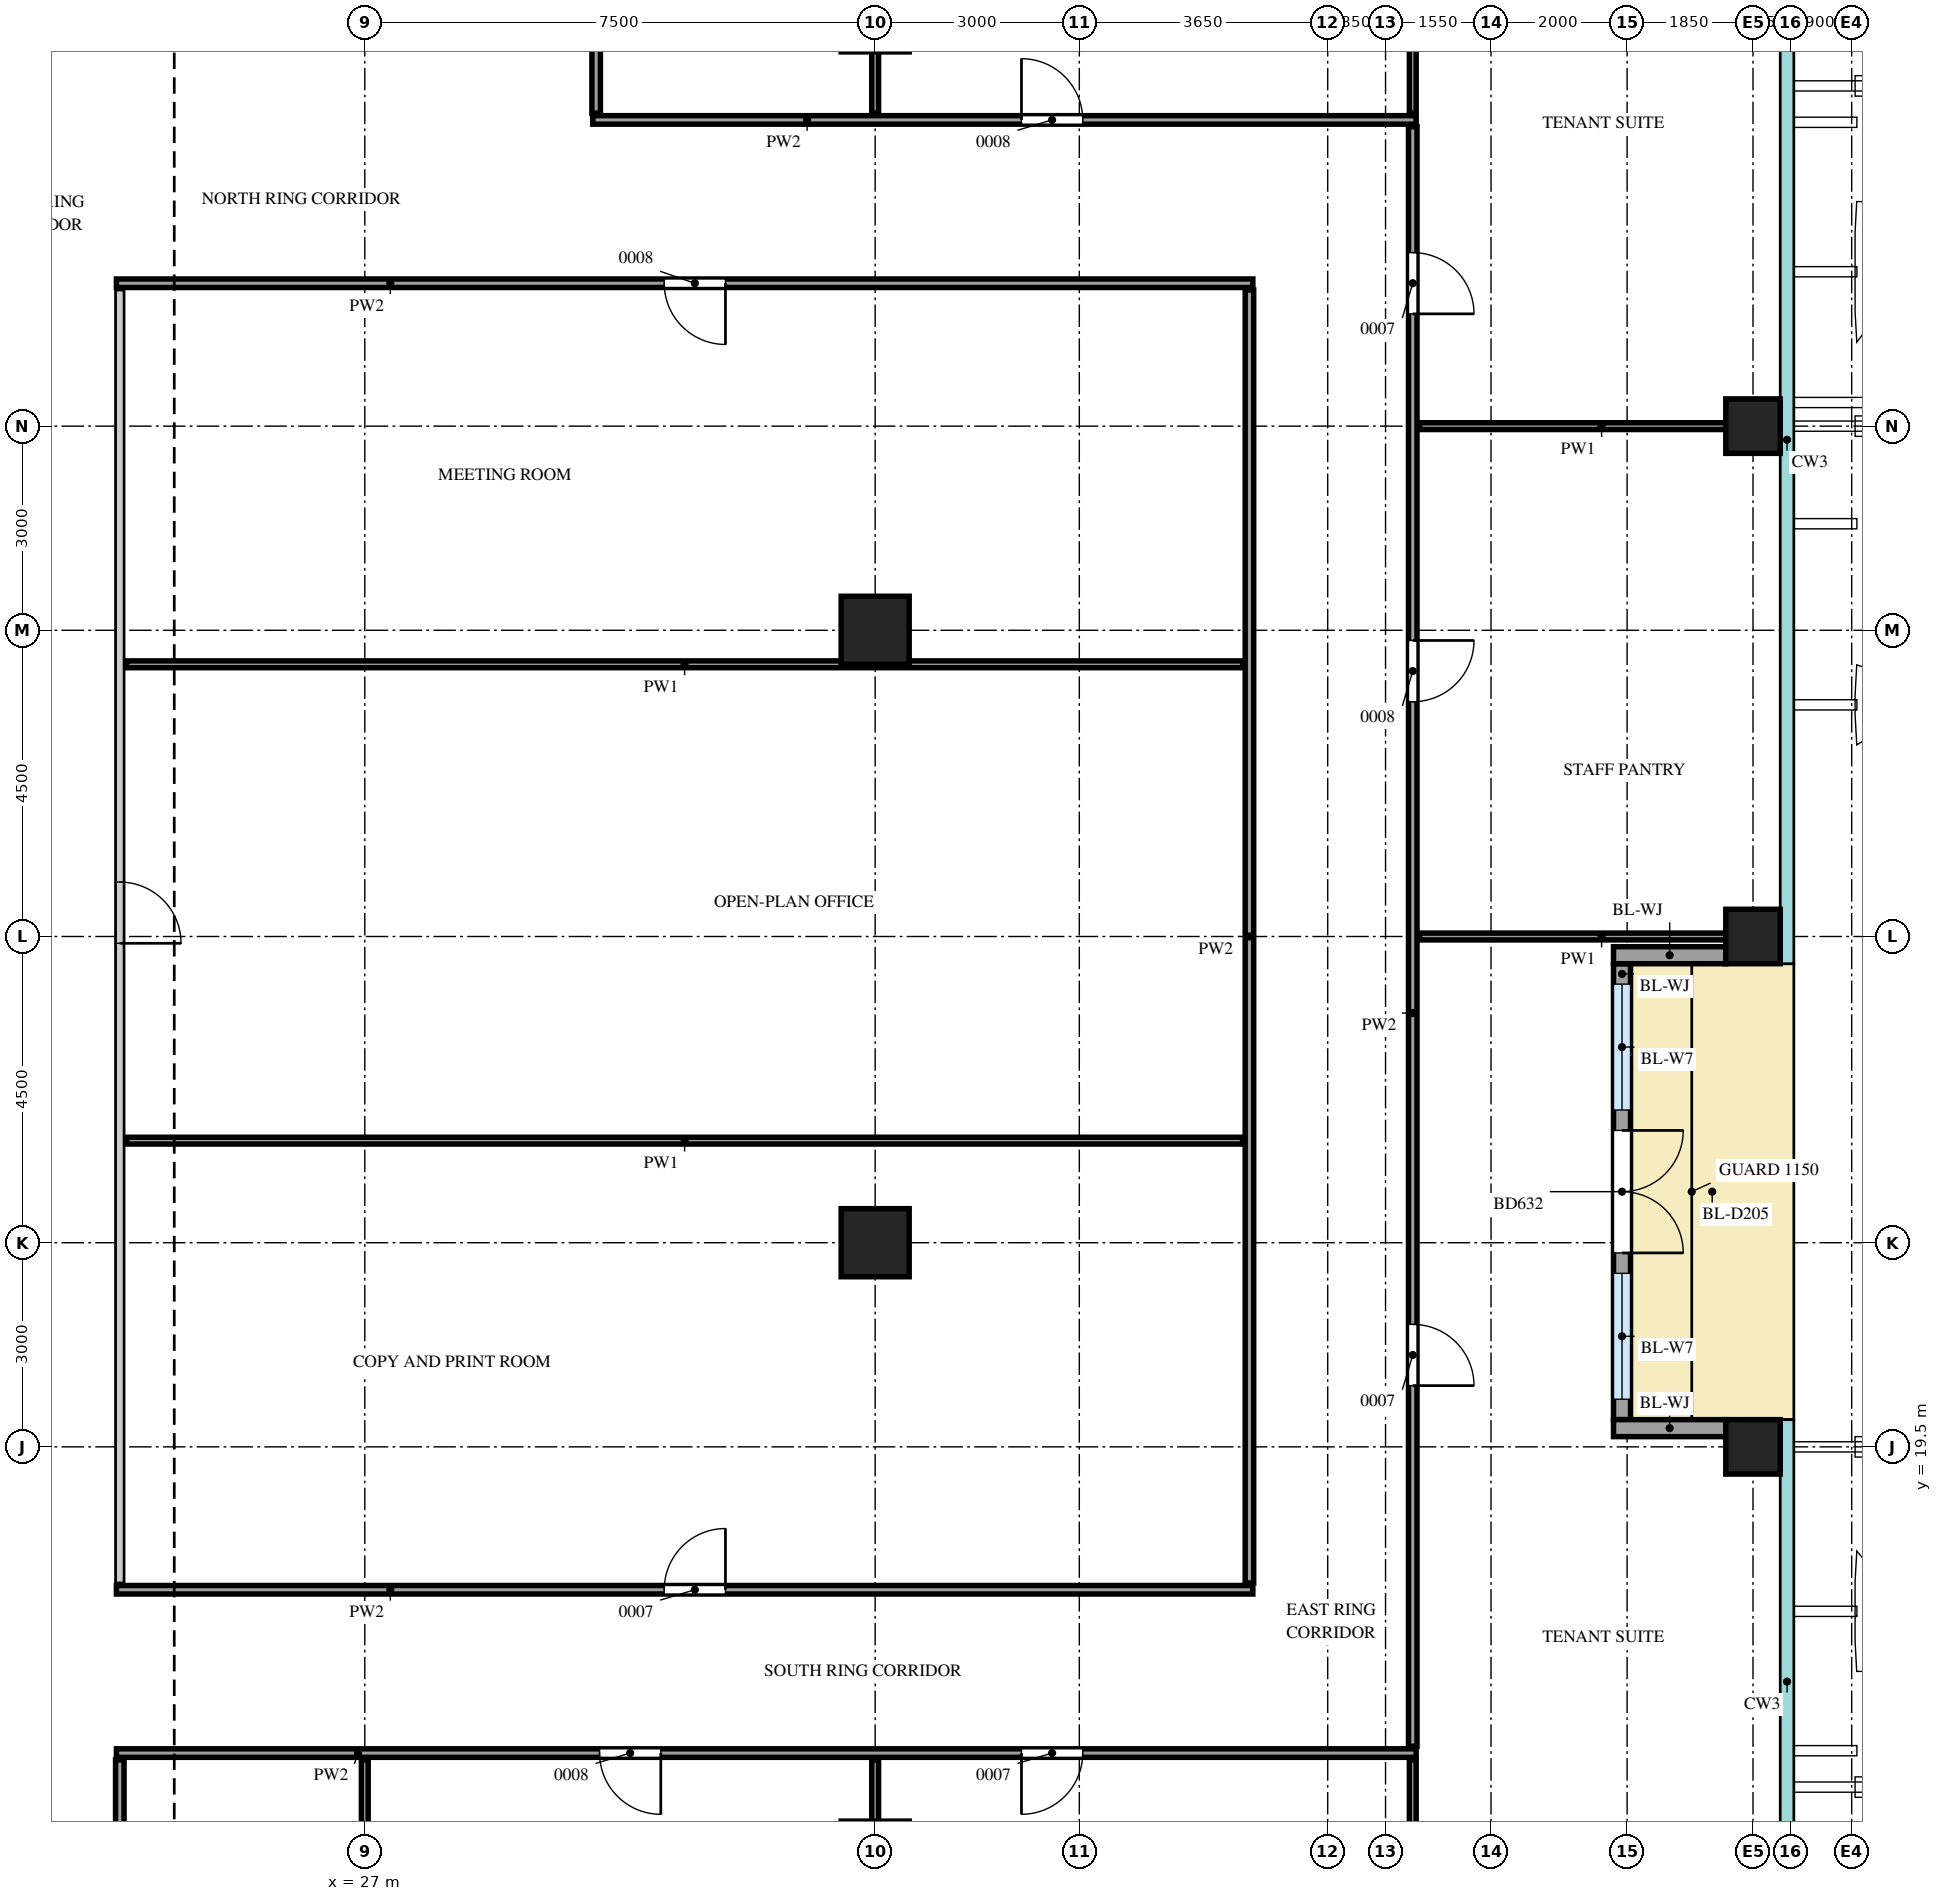
"""IFC4 building model, lengths in metres.
Left out: names, types, materials, properties, quantities, classifications, styles, units other than length and angle.
Written with IfcOpenShell. Run it as: python <this file> out.ifc"""

import sys

from ifc_helpers import new_model, si_unit, direction, frame, frame_2d, origin, origin_2d, place, context, subcontext, project, spatial, rectangle, extrude, source, transform, mapped, element, fill, save


model = new_model("IFC4")
c1 = context("Model", 3, precision=1e-05, world=origin(), true_north=direction((0.0, 1.0)))
c2 = subcontext(c1, "Body", "Model", "MODEL_VIEW")
j1 = project(units=[si_unit("LENGTHUNIT", "METRE"), si_unit("PLANEANGLEUNIT", "RADIAN")], contexts=[c1])
p1 = place(None, origin())
s1 = spatial("IfcSite", under=j1, at=p1, CompositionType="ELEMENT")
p2 = place(p1, origin())
s2 = spatial("IfcBuilding", under=s1, at=p2, CompositionType="ELEMENT")
p3 = place(p2, frame((0.0, 0.0, 282.2)))
s3 = spatial("IfcBuildingStorey", under=s2, at=p3, CompositionType="ELEMENT", Elevation=282.2)
m1 = source(origin(), c2, "Body", "SweptSolid", [
    extrude(rectangle(XDim=0.8, YDim=0.8, at=origin_2d()), origin(), (0.0, 0.0, 1.0), 3.75),
])
for number, where, z_axis, x_axis in (
    (1, (47.4, 19.5, 0.0), (0.0, 0.0, 1.0), (1.0, 0.0, 0.0)),
    (2, (47.4, 27.0, 0.0), (0.0, 0.0, 1.0), (1.0, 0.0, 0.0)),
    (3, (47.4, 34.5, 0.0), (0.0, 0.0, 1.0), (1.0, 0.0, 0.0)),
):
    element("IfcColumn", number, at=place(p3, frame(where, z_axis=z_axis, x_axis=x_axis)), inside=s3, PredefinedType="COLUMN", context=c2, shape_type="MappedRepresentation", body=[
        mapped(m1, transform((0.0, 0.0, 0.0))),
    ])
m2 = source(origin(), c2, "Body", "SweptSolid", [
    extrude(rectangle(XDim=1.0, YDim=1.0, at=origin_2d()), origin(), (0.0, 0.0, 1.0), 3.75),
])
for number, where, z_axis, x_axis in (
    (4, (34.5, 22.5, 0.0), (0.0, 0.0, 1.0), (1.0, 0.0, 0.0)),
    (5, (34.5, 31.5, 0.0), (0.0, 0.0, 1.0), (1.0, 0.0, 0.0)),
):
    element("IfcColumn", number, at=place(p3, frame(where, z_axis=z_axis, x_axis=x_axis)), inside=s3, PredefinedType="COLUMN", context=c2, shape_type="MappedRepresentation", body=[
        mapped(m2, transform((0.0, 0.0, 0.0))),
    ])
m3 = source(origin(), c2, "Body", "SweptSolid", [
    extrude(rectangle(XDim=6.7, YDim=0.25, at=frame_2d((3.35, 0.0))), origin(), (0.0, 0.0, 1.0), 3.2),
])
p4 = place(p3, frame((45.475, 19.9, 0.0), z_axis=(0.0, 0.0, 1.0), x_axis=(0.0, 1.0, 0.0)))
e6 = element("IfcWall", 6, at=p4, inside=s3, PredefinedType="SOLIDWALL", context=c2, shape_type="MappedRepresentation", body=[
    mapped(m3, transform((0.0, 0.0, 0.0))),
])
m4 = source(origin(), c2, "Body", "SweptSolid", [
    extrude(rectangle(XDim=1.85, YDim=2.4, at=frame_2d((0.925, 1.2))), frame((0.0, 0.135, 0.0), z_axis=(0.0, -1.0, 0.0), x_axis=(1.0, 0.0, 0.0)), (0.0, 0.0, 1.0), 0.27),
])
p5 = place(p4, frame((0.3, 0.0, 0.0)))
e7 = element("IfcOpeningElement", 7, at=p5, cuts=e6, PredefinedType="OPENING", context=c2, shape_type="MappedRepresentation", body=[
    mapped(m4, transform((0.0, 0.0, 0.0))),
])
p6 = place(p4, frame((4.55, 0.0, 0.0)))
e8 = element("IfcOpeningElement", 8, at=p6, cuts=e6, PredefinedType="OPENING", context=c2, shape_type="MappedRepresentation", body=[
    mapped(m4, transform((0.0, 0.0, 0.0))),
])
m5 = source(origin(), c2, "Body", "SweptSolid", [
    extrude(rectangle(XDim=1.8, YDim=2.4, at=frame_2d((0.9, 1.2))), frame((0.0, 0.135, 0.0), z_axis=(0.0, -1.0, 0.0), x_axis=(1.0, 0.0, 0.0)), (0.0, 0.0, 1.0), 0.27),
])
p7 = place(p4, frame((2.45, 0.0, 0.0)))
e9 = element("IfcOpeningElement", 9, at=p7, cuts=e6, PredefinedType="OPENING", context=c2, shape_type="MappedRepresentation", body=[
    mapped(m5, transform((0.0, 0.0, 0.0))),
])
m6 = source(origin(), c2, "Body", "SweptSolid", [
    extrude(rectangle(XDim=1.65, YDim=0.25, at=frame_2d((0.825, 0.0))), origin(), (0.0, 0.0, 1.0), 3.2),
])
for number, where, z_axis, x_axis in (
    (10, (47.0, 19.775, 0.0), (0.0, 0.0, 1.0), (-1.0, 0.0, 0.0)),
    (11, (47.0, 26.725, 0.0), (0.0, 0.0, 1.0), (-1.0, 0.0, 0.0)),
):
    element("IfcWall", number, at=place(p3, frame(where, z_axis=z_axis, x_axis=x_axis)), inside=s3, PredefinedType="SOLIDWALL", context=c2, shape_type="MappedRepresentation", body=[
        mapped(m6, transform((0.0, 0.0, 0.0))),
    ])
m7 = source(origin(), c2, "Body", "SweptSolid", [
    extrude(rectangle(XDim=8.75, YDim=0.125, at=frame_2d((4.375, 0.0))), origin(), (0.0, 0.0, 1.0), 3.8),
])
p8 = place(p3, frame((23.4, 6.15, 0.0), z_axis=(0.0, 0.0, 1.0), x_axis=(0.0, 1.0, 0.0)))
e12 = element("IfcWall", 12, at=p8, inside=s3, PredefinedType="PARTITIONING", context=c2, shape_type="MappedRepresentation", body=[
    mapped(m7, transform((0.0, 0.0, 0.0))),
])
m8 = source(origin(), c2, "Body", "SweptSolid", [
    extrude(rectangle(XDim=0.9, YDim=2.1, at=frame_2d((0.45, 1.05))), frame((0.0, 0.073, 0.0), z_axis=(0.0, -1.0, 0.0), x_axis=(1.0, 0.0, 0.0)), (0.0, 0.0, 1.0), 0.145),
])
p9 = place(p8, frame((2.25, 0.0, 0.0)))
e13 = element("IfcOpeningElement", 13, at=p9, cuts=e12, PredefinedType="OPENING", context=c2, shape_type="MappedRepresentation", body=[
    mapped(m8, transform((0.0, 0.0, 0.0))),
])
m9 = source(origin(), c2, "Body", "SweptSolid", [
    extrude(rectangle(XDim=8.75, YDim=0.1, at=frame_2d((4.375, 0.0))), origin(), (0.0, 0.0, 1.0), 3.35),
])
for number, where, z_axis, x_axis in (
    (14, (27.0, 6.15, 0.0), (0.0, 0.0, 1.0), (0.0, 1.0, 0.0)),
    (15, (34.5, 6.15, 0.0), (0.0, 0.0, 1.0), (0.0, 1.0, 0.0)),
):
    element("IfcWall", number, at=place(p3, frame(where, z_axis=z_axis, x_axis=x_axis)), inside=s3, PredefinedType="PARTITIONING", context=c2, shape_type="MappedRepresentation", body=[
        mapped(m9, transform((0.0, 0.0, 0.0))),
    ])
m10 = source(origin(), c2, "Body", "SweptSolid", [
    extrude(rectangle(XDim=2.75, YDim=0.1, at=frame_2d((1.375, 0.0))), origin(), (0.0, 0.0, 1.0), 3.8),
])
p10 = place(p3, frame((42.4, 12.15, 0.0), z_axis=(0.0, 0.0, 1.0), x_axis=(0.0, 1.0, 0.0)))
e16 = element("IfcWall", 16, at=p10, inside=s3, PredefinedType="PARTITIONING", context=c2, shape_type="MappedRepresentation", body=[
    mapped(m10, transform((0.0, 0.0, 0.0))),
])
m11 = source(origin(), c2, "Body", "SweptSolid", [
    extrude(rectangle(XDim=19.1, YDim=0.125, at=frame_2d((9.55, 0.0))), origin(), (0.0, 0.0, 1.0), 3.8),
])
p11 = place(p3, frame((23.35, 15.0, 0.0), z_axis=(0.0, 0.0, 1.0), x_axis=(1.0, 0.0, 0.0)))
e17 = element("IfcWall", 17, at=p11, inside=s3, PredefinedType="PARTITIONING", context=c2, shape_type="MappedRepresentation", body=[
    mapped(m11, transform((0.0, 0.0, 0.0))),
])
p12 = place(p11, frame((7.1, 0.0, 0.0)))
e18 = element("IfcOpeningElement", 18, at=p12, cuts=e17, PredefinedType="OPENING", context=c2, shape_type="MappedRepresentation", body=[
    mapped(m8, transform((0.0, 0.0, 0.0))),
])
p13 = place(p11, frame((13.3, 0.0, 0.0)))
e19 = element("IfcOpeningElement", 19, at=p13, cuts=e17, PredefinedType="OPENING", context=c2, shape_type="MappedRepresentation", body=[
    mapped(m8, transform((0.0, 0.0, 0.0))),
])
m12 = source(origin(), c2, "Body", "SweptSolid", [
    extrude(rectangle(XDim=23.8, YDim=0.125, at=frame_2d((11.9, 0.0))), origin(), (0.0, 0.0, 1.0), 3.8),
])
p14 = place(p3, frame((42.4, 15.1, 0.0), z_axis=(0.0, 0.0, 1.0), x_axis=(0.0, 1.0, 0.0)))
e20 = element("IfcWall", 20, at=p14, inside=s3, PredefinedType="PARTITIONING", context=c2, shape_type="MappedRepresentation", body=[
    mapped(m12, transform((0.0, 0.0, 0.0))),
])
p15 = place(p14, frame((5.3, 0.0, 0.0)))
e21 = element("IfcOpeningElement", 21, at=p15, cuts=e20, PredefinedType="OPENING", context=c2, shape_type="MappedRepresentation", body=[
    mapped(m8, transform((0.0, 0.0, 0.0))),
])
p16 = place(p14, frame((15.35, 0.0, 0.0)))
e22 = element("IfcOpeningElement", 22, at=p16, cuts=e20, PredefinedType="OPENING", context=c2, shape_type="MappedRepresentation", body=[
    mapped(m8, transform((0.0, 0.0, 0.0))),
])
p17 = place(p14, frame((21.05, 0.0, 0.0)))
e23 = element("IfcOpeningElement", 23, at=p17, cuts=e20, PredefinedType="OPENING", context=c2, shape_type="MappedRepresentation", body=[
    mapped(m8, transform((0.0, 0.0, 0.0))),
])
m13 = source(origin(), c2, "Body", "SweptSolid", [
    extrude(rectangle(XDim=16.7, YDim=0.125, at=frame_2d((8.35, 0.0))), origin(), (0.0, 0.0, 1.0), 3.8),
])
p18 = place(p3, frame((23.35, 17.4, 0.0), z_axis=(0.0, 0.0, 1.0), x_axis=(1.0, 0.0, 0.0)))
e24 = element("IfcWall", 24, at=p18, inside=s3, PredefinedType="PARTITIONING", context=c2, shape_type="MappedRepresentation", body=[
    mapped(m13, transform((0.0, 0.0, 0.0))),
])
p19 = place(p18, frame((8.05, 0.0, 0.0)))
e25 = element("IfcOpeningElement", 25, at=p19, cuts=e24, PredefinedType="OPENING", context=c2, shape_type="MappedRepresentation", body=[
    mapped(m8, transform((0.0, 0.0, 0.0))),
])
m14 = source(origin(), c2, "Body", "SweptSolid", [
    extrude(rectangle(XDim=19.0, YDim=0.125, at=frame_2d((9.5, 0.0))), origin(), (0.0, 0.0, 1.0), 3.8),
])
p20 = place(p3, frame((23.4, 17.5, 0.0), z_axis=(0.0, 0.0, 1.0), x_axis=(0.0, 1.0, 0.0)))
e26 = element("IfcWall", 26, at=p20, inside=s3, PredefinedType="PARTITIONING", context=c2, shape_type="MappedRepresentation", body=[
    mapped(m14, transform((0.0, 0.0, 0.0))),
])
p21 = place(p20, frame((9.4, 0.0, 0.0)))
e27 = element("IfcOpeningElement", 27, at=p21, cuts=e26, PredefinedType="OPENING", context=c2, shape_type="MappedRepresentation", body=[
    mapped(m8, transform((0.0, 0.0, 0.0))),
])
p22 = place(p3, frame((40.0, 17.5, 0.0), z_axis=(0.0, 0.0, 1.0), x_axis=(0.0, 1.0, 0.0)))
e28 = element("IfcWall", 28, at=p22, inside=s3, PredefinedType="PARTITIONING", context=c2, shape_type="MappedRepresentation", body=[
    mapped(m14, transform((0.0, 0.0, 0.0))),
])
m15 = source(origin(), c2, "Body", "SweptSolid", [
    extrude(rectangle(XDim=16.4, YDim=0.1, at=frame_2d((8.2, 0.0))), origin(), (0.0, 0.0, 1.0), 3.8),
])
p23 = place(p3, frame((23.5, 24.0, 0.0), z_axis=(0.0, 0.0, 1.0), x_axis=(1.0, 0.0, 0.0)))
e29 = element("IfcWall", 29, at=p23, inside=s3, PredefinedType="PARTITIONING", context=c2, shape_type="MappedRepresentation", body=[
    mapped(m15, transform((0.0, 0.0, 0.0))),
])
m16 = source(origin(), c2, "Body", "SweptSolid", [
    extrude(rectangle(XDim=5.35, YDim=0.1, at=frame_2d((2.675, 0.0))), origin(), (0.0, 0.0, 1.0), 3.8),
])
p24 = place(p3, frame((42.5, 27.0, 0.0), z_axis=(0.0, 0.0, 1.0), x_axis=(1.0, 0.0, 0.0)))
e30 = element("IfcWall", 30, at=p24, inside=s3, PredefinedType="PARTITIONING", context=c2, shape_type="MappedRepresentation", body=[
    mapped(m16, transform((0.0, 0.0, 0.0))),
])
p25 = place(p3, frame((23.5, 31.0, 0.0), z_axis=(0.0, 0.0, 1.0), x_axis=(1.0, 0.0, 0.0)))
e31 = element("IfcWall", 31, at=p25, inside=s3, PredefinedType="PARTITIONING", context=c2, shape_type="MappedRepresentation", body=[
    mapped(m15, transform((0.0, 0.0, 0.0))),
])
p26 = place(p3, frame((42.5, 34.5, 0.0), z_axis=(0.0, 0.0, 1.0), x_axis=(1.0, 0.0, 0.0)))
e32 = element("IfcWall", 32, at=p26, inside=s3, PredefinedType="PARTITIONING", context=c2, shape_type="MappedRepresentation", body=[
    mapped(m16, transform((0.0, 0.0, 0.0))),
])
p27 = place(p3, frame((23.35, 36.6, 0.0), z_axis=(0.0, 0.0, 1.0), x_axis=(1.0, 0.0, 0.0)))
e33 = element("IfcWall", 33, at=p27, inside=s3, PredefinedType="PARTITIONING", context=c2, shape_type="MappedRepresentation", body=[
    mapped(m13, transform((0.0, 0.0, 0.0))),
])
p28 = place(p27, frame((8.05, 0.0, 0.0)))
e34 = element("IfcOpeningElement", 34, at=p28, cuts=e33, PredefinedType="OPENING", context=c2, shape_type="MappedRepresentation", body=[
    mapped(m8, transform((0.0, 0.0, 0.0))),
])
m17 = source(origin(), c2, "Body", "SweptSolid", [
    extrude(rectangle(XDim=12.1, YDim=0.125, at=frame_2d((6.05, 0.0))), origin(), (0.0, 0.0, 1.0), 3.8),
])
p29 = place(p3, frame((30.35, 39.0, 0.0), z_axis=(0.0, 0.0, 1.0), x_axis=(1.0, 0.0, 0.0)))
e35 = element("IfcWall", 35, at=p29, inside=s3, PredefinedType="PARTITIONING", context=c2, shape_type="MappedRepresentation", body=[
    mapped(m17, transform((0.0, 0.0, 0.0))),
])
p30 = place(p29, frame((6.3, 0.0, 0.0)))
e36 = element("IfcOpeningElement", 36, at=p30, cuts=e35, PredefinedType="OPENING", context=c2, shape_type="MappedRepresentation", body=[
    mapped(m8, transform((0.0, 0.0, 0.0))),
])
p31 = place(p3, frame((30.4, 39.1, 0.0), z_axis=(0.0, 0.0, 1.0), x_axis=(0.0, 1.0, 0.0)))
e37 = element("IfcWall", 37, at=p31, inside=s3, PredefinedType="PARTITIONING", context=c2, shape_type="MappedRepresentation", body=[
    mapped(m7, transform((0.0, 0.0, 0.0))),
])
p32 = place(p31, frame((2.9, 0.0, 0.0)))
e38 = element("IfcOpeningElement", 38, at=p32, cuts=e37, PredefinedType="OPENING", context=c2, shape_type="MappedRepresentation", body=[
    mapped(m8, transform((0.0, 0.0, 0.0))),
])
p33 = place(p3, frame((34.5, 39.1, 0.0), z_axis=(0.0, 0.0, 1.0), x_axis=(0.0, 1.0, 0.0)))
e39 = element("IfcWall", 39, at=p33, inside=s3, PredefinedType="PARTITIONING", context=c2, shape_type="MappedRepresentation", body=[
    mapped(m9, transform((0.0, 0.0, 0.0))),
])
p34 = place(p3, frame((42.4, 39.1, 0.0), z_axis=(0.0, 0.0, 1.0), x_axis=(0.0, 1.0, 0.0)))
e40 = element("IfcWall", 40, at=p34, inside=s3, PredefinedType="PARTITIONING", context=c2, shape_type="MappedRepresentation", body=[
    mapped(m10, transform((0.0, 0.0, 0.0))),
])
m18 = source(origin(), c2, "Body", "SweptSolid", [
    extrude(rectangle(XDim=1.85, YDim=2.4, at=frame_2d((0.925, 1.2))), frame((0.0, 0.03, 0.0), z_axis=(0.0, -1.0, 0.0), x_axis=(1.0, 0.0, 0.0)), (0.0, 0.0, 1.0), 0.06),
])
p35 = place(p5, origin())
e41 = element("IfcWindow", 41, at=p35, inside=s3, PartitioningType="SINGLE_PANEL", PredefinedType="WINDOW", context=c2, shape_type="MappedRepresentation", body=[
    mapped(m18, transform((0.0, 0.0, 0.0))),
])
fill(e7, e41)
p36 = place(p6, origin())
e42 = element("IfcWindow", 42, at=p36, inside=s3, PartitioningType="SINGLE_PANEL", PredefinedType="WINDOW", context=c2, shape_type="MappedRepresentation", body=[
    mapped(m18, transform((0.0, 0.0, 0.0))),
])
fill(e8, e42)
m19 = source(origin(), c2, "Body", "SweptSolid", [
    extrude(rectangle(XDim=1.8, YDim=2.4, at=frame_2d((0.9, 1.2))), frame((0.0, 0.025, 0.0), z_axis=(0.0, -1.0, 0.0), x_axis=(1.0, 0.0, 0.0)), (0.0, 0.0, 1.0), 0.05),
])
p37 = place(p7, origin())
e43 = element("IfcDoor", 43, at=p37, inside=s3, OperationType="DOUBLE_DOOR_DOUBLE_SWING", PredefinedType="DOOR", context=c2, shape_type="MappedRepresentation", body=[
    mapped(m19, transform((0.0, 0.0, 0.0))),
])
fill(e9, e43)
m20 = source(origin(), c2, "Body", "SweptSolid", [
    extrude(rectangle(XDim=0.9, YDim=2.1, at=frame_2d((0.45, 1.05))), frame((0.0, 0.025, 0.0), z_axis=(0.0, -1.0, 0.0), x_axis=(1.0, 0.0, 0.0)), (0.0, 0.0, 1.0), 0.05),
])
p38 = place(p12, origin())
e44 = element("IfcDoor", 44, at=p38, inside=s3, OperationType="SINGLE_SWING_RIGHT", PredefinedType="DOOR", context=c2, shape_type="MappedRepresentation", body=[
    mapped(m20, transform((0.0, 0.0, 0.0))),
])
fill(e18, e44)
p39 = place(p13, origin())
e45 = element("IfcDoor", 45, at=p39, inside=s3, OperationType="SINGLE_SWING_LEFT", PredefinedType="DOOR", context=c2, shape_type="MappedRepresentation", body=[
    mapped(m20, transform((0.0, 0.0, 0.0))),
])
fill(e19, e45)
p40 = place(p15, origin())
e46 = element("IfcDoor", 46, at=p40, inside=s3, OperationType="SINGLE_SWING_LEFT", PredefinedType="DOOR", context=c2, shape_type="MappedRepresentation", body=[
    mapped(m20, transform((0.0, 0.0, 0.0))),
])
fill(e21, e46)
p41 = place(p16, origin())
e47 = element("IfcDoor", 47, at=p41, inside=s3, OperationType="SINGLE_SWING_RIGHT", PredefinedType="DOOR", context=c2, shape_type="MappedRepresentation", body=[
    mapped(m20, transform((0.0, 0.0, 0.0))),
])
fill(e22, e47)
p42 = place(p17, origin())
e48 = element("IfcDoor", 48, at=p42, inside=s3, OperationType="SINGLE_SWING_LEFT", PredefinedType="DOOR", context=c2, shape_type="MappedRepresentation", body=[
    mapped(m20, transform((0.0, 0.0, 0.0))),
])
fill(e23, e48)
p43 = place(p30, origin())
e49 = element("IfcDoor", 49, at=p43, inside=s3, OperationType="SINGLE_SWING_RIGHT", PredefinedType="DOOR", context=c2, shape_type="MappedRepresentation", body=[
    mapped(m20, transform((0.0, 0.0, 0.0))),
])
fill(e36, e49)
p44 = place(p19, origin())
e50 = element("IfcDoor", 50, at=p44, inside=s3, OperationType="SINGLE_SWING_LEFT", PredefinedType="DOOR", context=c2, shape_type="MappedRepresentation", body=[
    mapped(m20, transform((0.0, 0.0, 0.0))),
])
fill(e25, e50)
p45 = place(p21, origin())
e51 = element("IfcDoor", 51, at=p45, inside=s3, OperationType="SINGLE_SWING_LEFT", PredefinedType="DOOR", context=c2, shape_type="MappedRepresentation", body=[
    mapped(m20, transform((0.0, 0.0, 0.0))),
])
fill(e27, e51)
p46 = place(p28, origin())
e52 = element("IfcDoor", 52, at=p46, inside=s3, OperationType="SINGLE_SWING_RIGHT", PredefinedType="DOOR", context=c2, shape_type="MappedRepresentation", body=[
    mapped(m20, transform((0.0, 0.0, 0.0))),
])
fill(e34, e52)
save(model, sys.argv[1])
